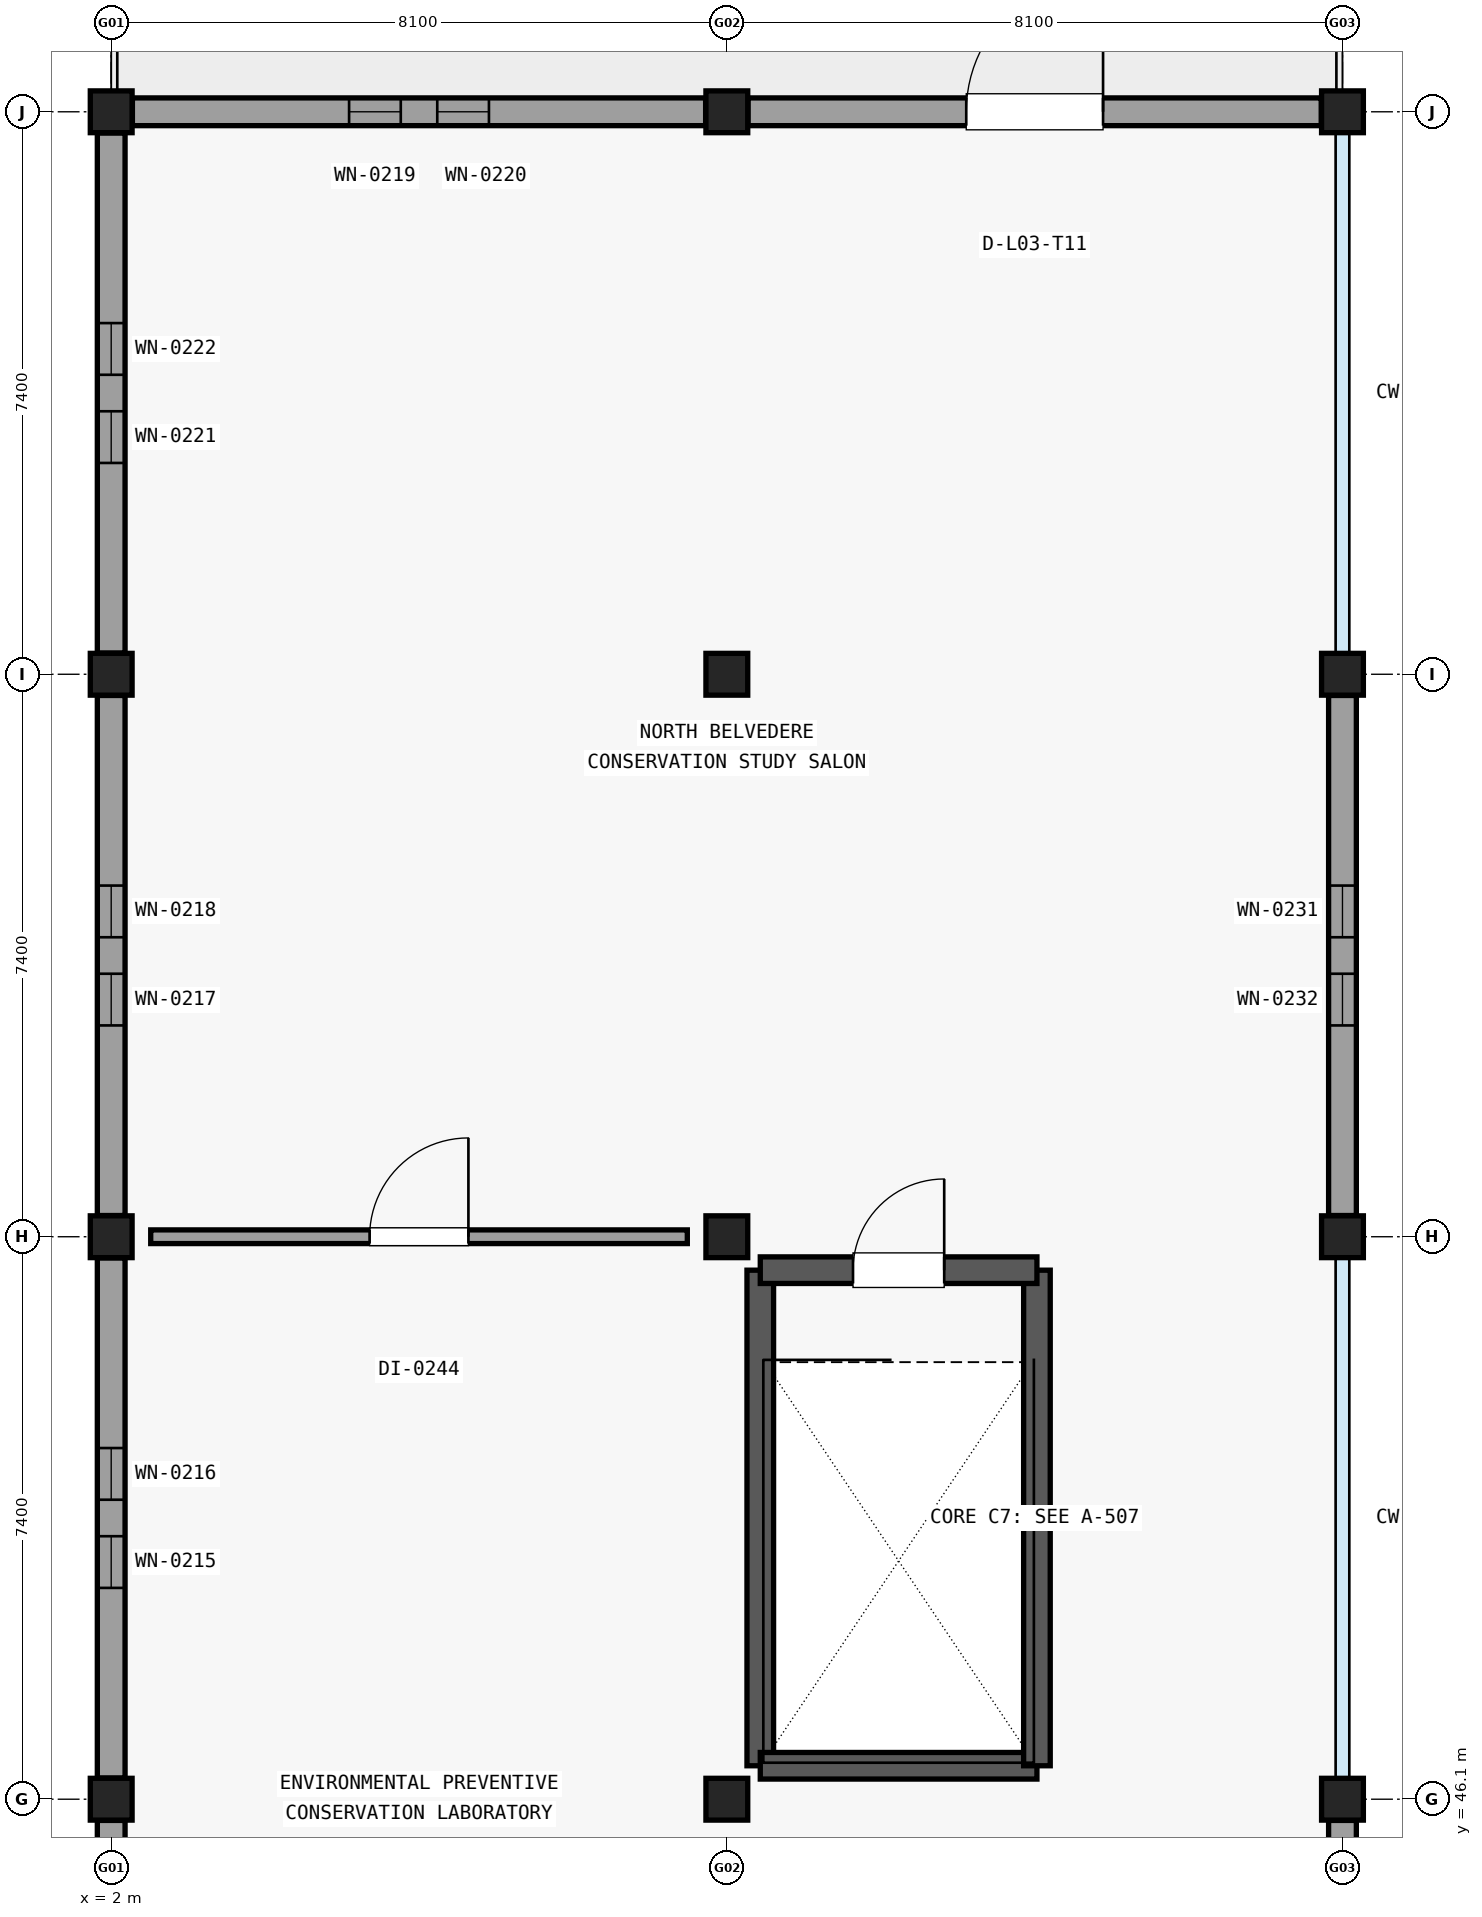
"""IFC4 building model, lengths in metres.
Left out: names, types, materials, properties, quantities, classifications, styles, units other than length and angle.
Written with IfcOpenShell. Run it as: python <this file> out.ifc"""

import sys

from ifc_helpers import new_model, si_unit, direction, frame, frame_2d, origin, origin_2d, place, context, subcontext, project, spatial, rectangle, extrude, element, fill, save


model = new_model("IFC4")
c1 = context("Model", 3, precision=1e-05, world=origin(), true_north=direction((0.0, 1.0)))
c2 = subcontext(c1, "Body", "Model", "MODEL_VIEW")
j1 = project(units=[si_unit("LENGTHUNIT", "METRE"), si_unit("PLANEANGLEUNIT", "RADIAN")], contexts=[c1])
p1 = place(None, origin())
s1 = spatial("IfcSite", under=j1, at=p1, CompositionType="ELEMENT")
p2 = place(p1, origin())
s2 = spatial("IfcBuilding", under=s1, at=p2, CompositionType="ELEMENT")
p3 = place(p2, frame((0.0, 0.0, 13.8)))
s3 = spatial("IfcBuildingStorey", under=s2, at=p3, CompositionType="ELEMENT", Elevation=13.8)
for number, where, z_axis, x_axis in (
    (1, (2.0, 46.1, 0.0), (0.0, 0.0, 1.0), (1.0, 0.0, 0.0)),
    (2, (2.0, 53.5, 0.0), (0.0, 0.0, 1.0), (1.0, 0.0, 0.0)),
    (3, (2.0, 60.9, 0.0), (0.0, 0.0, 1.0), (1.0, 0.0, 0.0)),
    (4, (2.0, 68.3, 0.0), (0.0, 0.0, 1.0), (1.0, 0.0, 0.0)),
    (5, (10.1, 46.1, 0.0), (0.0, 0.0, 1.0), (1.0, 0.0, 0.0)),
    (6, (10.1, 53.5, 0.0), (0.0, 0.0, 1.0), (1.0, 0.0, 0.0)),
    (7, (10.1, 60.9, 0.0), (0.0, 0.0, 1.0), (1.0, 0.0, 0.0)),
    (8, (10.1, 68.3, 0.0), (0.0, 0.0, 1.0), (1.0, 0.0, 0.0)),
    (9, (18.2, 46.1, 0.0), (0.0, 0.0, 1.0), (1.0, 0.0, 0.0)),
    (10, (18.2, 53.5, 0.0), (0.0, 0.0, 1.0), (1.0, 0.0, 0.0)),
    (11, (18.2, 60.9, 0.0), (0.0, 0.0, 1.0), (1.0, 0.0, 0.0)),
    (12, (18.2, 68.3, 0.0), (0.0, 0.0, 1.0), (1.0, 0.0, 0.0)),
):
    element("IfcColumn", number, at=place(p3, frame(where, z_axis=z_axis, x_axis=x_axis)), inside=s3, PredefinedType="COLUMN", context=c2, shape_type="SweptSolid", body=[
        extrude(rectangle(XDim=0.55, YDim=0.55, at=origin_2d()), origin(), (0.0, 0.0, 1.0), 3.38),
    ])
p4 = place(p3, frame((2.0, 38.979, 0.0), z_axis=(0.0, 0.0, 1.0), x_axis=(0.0, 1.0, 0.0)))
e13 = element("IfcWall", 13, at=p4, inside=s3, PredefinedType="SOLIDWALL", context=c2, shape_type="SweptSolid", body=[
    extrude(rectangle(XDim=6.842, YDim=0.365, at=frame_2d((3.421, 0.0))), origin(), (0.0, 0.0, 1.0), 2.908),
])
p5 = place(p4, frame((2.501, 0.0, 0.6)))
e14 = element("IfcOpeningElement", 14, at=p5, cuts=e13, PredefinedType="OPENING", context=c2, shape_type="SweptSolid", body=[
    extrude(rectangle(XDim=0.68, YDim=1.78, at=frame_2d((0.34, 0.89))), frame((0.0, 0.192, 0.0), z_axis=(0.0, -1.0, 0.0), x_axis=(1.0, 0.0, 0.0)), (0.0, 0.0, 1.0), 0.385),
])
p6 = place(p4, frame((3.661, 0.0, 0.6)))
e15 = element("IfcOpeningElement", 15, at=p6, cuts=e13, PredefinedType="OPENING", context=c2, shape_type="SweptSolid", body=[
    extrude(rectangle(XDim=0.68, YDim=1.78, at=frame_2d((0.34, 0.89))), frame((0.0, 0.192, 0.0), z_axis=(0.0, -1.0, 0.0), x_axis=(1.0, 0.0, 0.0)), (0.0, 0.0, 1.0), 0.385),
])
p7 = place(p3, frame((2.0, 46.379, 0.0), z_axis=(0.0, 0.0, 1.0), x_axis=(0.0, 1.0, 0.0)))
e16 = element("IfcWall", 16, at=p7, inside=s3, PredefinedType="SOLIDWALL", context=c2, shape_type="SweptSolid", body=[
    extrude(rectangle(XDim=6.842, YDim=0.365, at=frame_2d((3.421, 0.0))), origin(), (0.0, 0.0, 1.0), 2.908),
])
p8 = place(p7, frame((2.501, 0.0, 0.6)))
e17 = element("IfcOpeningElement", 17, at=p8, cuts=e16, PredefinedType="OPENING", context=c2, shape_type="SweptSolid", body=[
    extrude(rectangle(XDim=0.68, YDim=1.78, at=frame_2d((0.34, 0.89))), frame((0.0, 0.192, 0.0), z_axis=(0.0, -1.0, 0.0), x_axis=(1.0, 0.0, 0.0)), (0.0, 0.0, 1.0), 0.385),
])
p9 = place(p7, frame((3.661, 0.0, 0.6)))
e18 = element("IfcOpeningElement", 18, at=p9, cuts=e16, PredefinedType="OPENING", context=c2, shape_type="SweptSolid", body=[
    extrude(rectangle(XDim=0.68, YDim=1.78, at=frame_2d((0.34, 0.89))), frame((0.0, 0.192, 0.0), z_axis=(0.0, -1.0, 0.0), x_axis=(1.0, 0.0, 0.0)), (0.0, 0.0, 1.0), 0.385),
])
p10 = place(p3, frame((2.0, 53.779, 0.0), z_axis=(0.0, 0.0, 1.0), x_axis=(0.0, 1.0, 0.0)))
e19 = element("IfcWall", 19, at=p10, inside=s3, PredefinedType="SOLIDWALL", context=c2, shape_type="SweptSolid", body=[
    extrude(rectangle(XDim=6.842, YDim=0.365, at=frame_2d((3.421, 0.0))), origin(), (0.0, 0.0, 1.0), 2.908),
])
p11 = place(p10, frame((2.501, 0.0, 0.6)))
e20 = element("IfcOpeningElement", 20, at=p11, cuts=e19, PredefinedType="OPENING", context=c2, shape_type="SweptSolid", body=[
    extrude(rectangle(XDim=0.68, YDim=1.78, at=frame_2d((0.34, 0.89))), frame((0.0, 0.192, 0.0), z_axis=(0.0, -1.0, 0.0), x_axis=(1.0, 0.0, 0.0)), (0.0, 0.0, 1.0), 0.385),
])
p12 = place(p10, frame((3.661, 0.0, 0.6)))
e21 = element("IfcOpeningElement", 21, at=p12, cuts=e19, PredefinedType="OPENING", context=c2, shape_type="SweptSolid", body=[
    extrude(rectangle(XDim=0.68, YDim=1.78, at=frame_2d((0.34, 0.89))), frame((0.0, 0.192, 0.0), z_axis=(0.0, -1.0, 0.0), x_axis=(1.0, 0.0, 0.0)), (0.0, 0.0, 1.0), 0.385),
])
p13 = place(p3, frame((2.279, 68.3, 0.0), z_axis=(0.0, 0.0, 1.0), x_axis=(1.0, 0.0, 0.0)))
e22 = element("IfcWall", 22, at=p13, inside=s3, PredefinedType="SOLIDWALL", context=c2, shape_type="SweptSolid", body=[
    extrude(rectangle(XDim=7.542, YDim=0.365, at=frame_2d((3.771, 0.0))), origin(), (0.0, 0.0, 1.0), 2.908),
])
p14 = place(p13, frame((2.851, 0.0, 0.6)))
e23 = element("IfcOpeningElement", 23, at=p14, cuts=e22, PredefinedType="OPENING", context=c2, shape_type="SweptSolid", body=[
    extrude(rectangle(XDim=0.68, YDim=1.78, at=frame_2d((0.34, 0.89))), frame((0.0, 0.192, 0.0), z_axis=(0.0, -1.0, 0.0), x_axis=(1.0, 0.0, 0.0)), (0.0, 0.0, 1.0), 0.385),
])
p15 = place(p13, frame((4.011, 0.0, 0.6)))
e24 = element("IfcOpeningElement", 24, at=p15, cuts=e22, PredefinedType="OPENING", context=c2, shape_type="SweptSolid", body=[
    extrude(rectangle(XDim=0.68, YDim=1.78, at=frame_2d((0.34, 0.89))), frame((0.0, 0.192, 0.0), z_axis=(0.0, -1.0, 0.0), x_axis=(1.0, 0.0, 0.0)), (0.0, 0.0, 1.0), 0.385),
])
p16 = place(p3, frame((2.0, 61.179, 0.0), z_axis=(0.0, 0.0, 1.0), x_axis=(0.0, 1.0, 0.0)))
e25 = element("IfcWall", 25, at=p16, inside=s3, PredefinedType="SOLIDWALL", context=c2, shape_type="SweptSolid", body=[
    extrude(rectangle(XDim=6.842, YDim=0.365, at=frame_2d((3.421, 0.0))), origin(), (0.0, 0.0, 1.0), 2.908),
])
p17 = place(p16, frame((2.501, 0.0, 0.6)))
e26 = element("IfcOpeningElement", 26, at=p17, cuts=e25, PredefinedType="OPENING", context=c2, shape_type="SweptSolid", body=[
    extrude(rectangle(XDim=0.68, YDim=1.78, at=frame_2d((0.34, 0.89))), frame((0.0, 0.192, 0.0), z_axis=(0.0, -1.0, 0.0), x_axis=(1.0, 0.0, 0.0)), (0.0, 0.0, 1.0), 0.385),
])
p18 = place(p16, frame((3.661, 0.0, 0.6)))
e27 = element("IfcOpeningElement", 27, at=p18, cuts=e25, PredefinedType="OPENING", context=c2, shape_type="SweptSolid", body=[
    extrude(rectangle(XDim=0.68, YDim=1.78, at=frame_2d((0.34, 0.89))), frame((0.0, 0.192, 0.0), z_axis=(0.0, -1.0, 0.0), x_axis=(1.0, 0.0, 0.0)), (0.0, 0.0, 1.0), 0.385),
])
p19 = place(p3, frame((18.2, 45.821, 0.0), z_axis=(0.0, 0.0, 1.0), x_axis=(0.0, -1.0, 0.0)))
e28 = element("IfcWall", 28, at=p19, inside=s3, PredefinedType="SOLIDWALL", context=c2, shape_type="SweptSolid", body=[
    extrude(rectangle(XDim=6.842, YDim=0.365, at=frame_2d((3.421, 0.0))), origin(), (0.0, 0.0, 1.0), 2.908),
])
p20 = place(p19, frame((2.501, 0.0, 0.6)))
e29 = element("IfcOpeningElement", 29, at=p20, cuts=e28, PredefinedType="OPENING", context=c2, shape_type="SweptSolid", body=[
    extrude(rectangle(XDim=0.68, YDim=1.78, at=frame_2d((0.34, 0.89))), frame((0.0, 0.192, 0.0), z_axis=(0.0, -1.0, 0.0), x_axis=(1.0, 0.0, 0.0)), (0.0, 0.0, 1.0), 0.385),
])
p21 = place(p19, frame((3.661, 0.0, 0.6)))
e30 = element("IfcOpeningElement", 30, at=p21, cuts=e28, PredefinedType="OPENING", context=c2, shape_type="SweptSolid", body=[
    extrude(rectangle(XDim=0.68, YDim=1.78, at=frame_2d((0.34, 0.89))), frame((0.0, 0.192, 0.0), z_axis=(0.0, -1.0, 0.0), x_axis=(1.0, 0.0, 0.0)), (0.0, 0.0, 1.0), 0.385),
])
p22 = place(p3, frame((18.2, 60.621, 0.0), z_axis=(0.0, 0.0, 1.0), x_axis=(0.0, -1.0, 0.0)))
e31 = element("IfcWall", 31, at=p22, inside=s3, PredefinedType="SOLIDWALL", context=c2, shape_type="SweptSolid", body=[
    extrude(rectangle(XDim=6.842, YDim=0.365, at=frame_2d((3.421, 0.0))), origin(), (0.0, 0.0, 1.0), 2.908),
])
p23 = place(p22, frame((2.501, 0.0, 0.6)))
e32 = element("IfcOpeningElement", 32, at=p23, cuts=e31, PredefinedType="OPENING", context=c2, shape_type="SweptSolid", body=[
    extrude(rectangle(XDim=0.68, YDim=1.78, at=frame_2d((0.34, 0.89))), frame((0.0, 0.192, 0.0), z_axis=(0.0, -1.0, 0.0), x_axis=(1.0, 0.0, 0.0)), (0.0, 0.0, 1.0), 0.385),
])
p24 = place(p22, frame((3.661, 0.0, 0.6)))
e33 = element("IfcOpeningElement", 33, at=p24, cuts=e31, PredefinedType="OPENING", context=c2, shape_type="SweptSolid", body=[
    extrude(rectangle(XDim=0.68, YDim=1.78, at=frame_2d((0.34, 0.89))), frame((0.0, 0.192, 0.0), z_axis=(0.0, -1.0, 0.0), x_axis=(1.0, 0.0, 0.0)), (0.0, 0.0, 1.0), 0.385),
])
p25 = place(p3, frame((10.379, 68.3, 0.0), z_axis=(0.0, 0.0, 1.0), x_axis=(1.0, 0.0, 0.0)))
e34 = element("IfcWall", 34, at=p25, inside=s3, PredefinedType="SOLIDWALL", context=c2, shape_type="SweptSolid", body=[
    extrude(rectangle(XDim=7.542, YDim=0.365, at=frame_2d((3.771, 0.0))), origin(), (0.0, 0.0, 1.0), 2.908),
])
p26 = place(p25, frame((2.871, 0.0, 0.0)))
e35 = element("IfcOpeningElement", 35, at=p26, cuts=e34, PredefinedType="OPENING", context=c2, shape_type="SweptSolid", body=[
    extrude(rectangle(XDim=1.8, YDim=2.2, at=frame_2d((0.9, 1.1))), frame((0.0, 0.192, 0.0), z_axis=(0.0, -1.0, 0.0), x_axis=(1.0, 0.0, 0.0)), (0.0, 0.0, 1.0), 0.385),
])
p27 = place(p3, frame((10.54, 46.54, 0.0), z_axis=(0.0, 0.0, 1.0), x_axis=(0.0, 1.0, 0.0)))
e36 = element("IfcWall", 36, at=p27, inside=s3, PredefinedType="SHEAR", context=c2, shape_type="SweptSolid", body=[
    extrude(rectangle(XDim=6.52, YDim=0.35, at=frame_2d((3.26, 0.0))), origin(), (0.0, 0.0, 1.0), 3.375),
])
p28 = place(p3, frame((10.54, 46.54, 0.0), z_axis=(0.0, 0.0, 1.0), x_axis=(1.0, 0.0, 0.0)))
e37 = element("IfcWall", 37, at=p28, inside=s3, PredefinedType="SHEAR", context=c2, shape_type="SweptSolid", body=[
    extrude(rectangle(XDim=3.64, YDim=0.35, at=frame_2d((1.82, 0.0))), origin(), (0.0, 0.0, 1.0), 3.375),
])
p29 = place(p3, frame((14.18, 46.54, 0.0), z_axis=(0.0, 0.0, 1.0), x_axis=(0.0, 1.0, 0.0)))
e38 = element("IfcWall", 38, at=p29, inside=s3, PredefinedType="SHEAR", context=c2, shape_type="SweptSolid", body=[
    extrude(rectangle(XDim=6.52, YDim=0.35, at=frame_2d((3.26, 0.0))), origin(), (0.0, 0.0, 1.0), 3.375),
])
p30 = place(p3, frame((10.54, 53.06, 0.0), z_axis=(0.0, 0.0, 1.0), x_axis=(1.0, 0.0, 0.0)))
e39 = element("IfcWall", 39, at=p30, inside=s3, PredefinedType="SHEAR", context=c2, shape_type="SweptSolid", body=[
    extrude(rectangle(XDim=3.64, YDim=0.35, at=frame_2d((1.82, 0.0))), origin(), (0.0, 0.0, 1.0), 3.375),
])
p31 = place(p30, frame((1.22, 0.0, 0.0)))
e40 = element("IfcOpeningElement", 40, at=p31, cuts=e39, PredefinedType="OPENING", context=c2, shape_type="SweptSolid", body=[
    extrude(rectangle(XDim=1.2, YDim=2.15, at=frame_2d((0.6, 1.075))), frame((0.0, 0.185, 0.0), z_axis=(0.0, -1.0, 0.0), x_axis=(1.0, 0.0, 0.0)), (0.0, 0.0, 1.0), 0.37),
])
p32 = place(p3, frame((2.52, 53.5, 0.0), z_axis=(0.0, 0.0, 1.0), x_axis=(1.0, 0.0, 0.0)))
e41 = element("IfcWall", 41, at=p32, inside=s3, PredefinedType="PARTITIONING", context=c2, shape_type="SweptSolid", body=[
    extrude(rectangle(XDim=7.06, YDim=0.18, at=frame_2d((3.53, 0.0))), origin(), (0.0, 0.0, 1.0), 2.913),
])
p33 = place(p32, frame((2.88, 0.0, 0.0)))
e42 = element("IfcOpeningElement", 42, at=p33, cuts=e41, PredefinedType="OPENING", context=c2, shape_type="SweptSolid", body=[
    extrude(rectangle(XDim=1.3, YDim=2.2, at=frame_2d((0.65, 1.1))), frame((0.0, 0.1, 0.0), z_axis=(0.0, -1.0, 0.0), x_axis=(1.0, 0.0, 0.0)), (0.0, 0.0, 1.0), 0.2),
])
p34 = place(p8, origin())
e43 = element("IfcWindow", 43, at=p34, inside=s3, PartitioningType="SINGLE_PANEL", PredefinedType="WINDOW", context=c2, shape_type="SweptSolid", body=[
    extrude(rectangle(XDim=0.68, YDim=1.78, at=frame_2d((0.34, 0.89))), frame((0.0, 0.03, 0.0), z_axis=(0.0, -1.0, 0.0), x_axis=(1.0, 0.0, 0.0)), (0.0, 0.0, 1.0), 0.06),
])
fill(e17, e43)
p35 = place(p9, origin())
e44 = element("IfcWindow", 44, at=p35, inside=s3, PartitioningType="SINGLE_PANEL", PredefinedType="WINDOW", context=c2, shape_type="SweptSolid", body=[
    extrude(rectangle(XDim=0.68, YDim=1.78, at=frame_2d((0.34, 0.89))), frame((0.0, 0.03, 0.0), z_axis=(0.0, -1.0, 0.0), x_axis=(1.0, 0.0, 0.0)), (0.0, 0.0, 1.0), 0.06),
])
fill(e18, e44)
p36 = place(p11, origin())
e45 = element("IfcWindow", 45, at=p36, inside=s3, PartitioningType="SINGLE_PANEL", PredefinedType="WINDOW", context=c2, shape_type="SweptSolid", body=[
    extrude(rectangle(XDim=0.68, YDim=1.78, at=frame_2d((0.34, 0.89))), frame((0.0, 0.03, 0.0), z_axis=(0.0, -1.0, 0.0), x_axis=(1.0, 0.0, 0.0)), (0.0, 0.0, 1.0), 0.06),
])
fill(e20, e45)
p37 = place(p12, origin())
e46 = element("IfcWindow", 46, at=p37, inside=s3, PartitioningType="SINGLE_PANEL", PredefinedType="WINDOW", context=c2, shape_type="SweptSolid", body=[
    extrude(rectangle(XDim=0.68, YDim=1.78, at=frame_2d((0.34, 0.89))), frame((0.0, 0.03, 0.0), z_axis=(0.0, -1.0, 0.0), x_axis=(1.0, 0.0, 0.0)), (0.0, 0.0, 1.0), 0.06),
])
fill(e21, e46)
p38 = place(p14, origin())
e47 = element("IfcWindow", 47, at=p38, inside=s3, PartitioningType="SINGLE_PANEL", PredefinedType="WINDOW", context=c2, shape_type="SweptSolid", body=[
    extrude(rectangle(XDim=0.68, YDim=1.78, at=frame_2d((0.34, 0.89))), frame((0.0, 0.03, 0.0), z_axis=(0.0, -1.0, 0.0), x_axis=(1.0, 0.0, 0.0)), (0.0, 0.0, 1.0), 0.06),
])
fill(e23, e47)
p39 = place(p15, origin())
e48 = element("IfcWindow", 48, at=p39, inside=s3, PartitioningType="SINGLE_PANEL", PredefinedType="WINDOW", context=c2, shape_type="SweptSolid", body=[
    extrude(rectangle(XDim=0.68, YDim=1.78, at=frame_2d((0.34, 0.89))), frame((0.0, 0.03, 0.0), z_axis=(0.0, -1.0, 0.0), x_axis=(1.0, 0.0, 0.0)), (0.0, 0.0, 1.0), 0.06),
])
fill(e24, e48)
p40 = place(p17, origin())
e49 = element("IfcWindow", 49, at=p40, inside=s3, PartitioningType="SINGLE_PANEL", PredefinedType="WINDOW", context=c2, shape_type="SweptSolid", body=[
    extrude(rectangle(XDim=0.68, YDim=1.78, at=frame_2d((0.34, 0.89))), frame((0.0, 0.03, 0.0), z_axis=(0.0, -1.0, 0.0), x_axis=(1.0, 0.0, 0.0)), (0.0, 0.0, 1.0), 0.06),
])
fill(e26, e49)
p41 = place(p18, origin())
e50 = element("IfcWindow", 50, at=p41, inside=s3, PartitioningType="SINGLE_PANEL", PredefinedType="WINDOW", context=c2, shape_type="SweptSolid", body=[
    extrude(rectangle(XDim=0.68, YDim=1.78, at=frame_2d((0.34, 0.89))), frame((0.0, 0.03, 0.0), z_axis=(0.0, -1.0, 0.0), x_axis=(1.0, 0.0, 0.0)), (0.0, 0.0, 1.0), 0.06),
])
fill(e27, e50)
p42 = place(p23, origin())
e51 = element("IfcWindow", 51, at=p42, inside=s3, PartitioningType="SINGLE_PANEL", PredefinedType="WINDOW", context=c2, shape_type="SweptSolid", body=[
    extrude(rectangle(XDim=0.68, YDim=1.78, at=frame_2d((0.34, 0.89))), frame((0.0, 0.03, 0.0), z_axis=(0.0, -1.0, 0.0), x_axis=(1.0, 0.0, 0.0)), (0.0, 0.0, 1.0), 0.06),
])
fill(e32, e51)
p43 = place(p24, origin())
e52 = element("IfcWindow", 52, at=p43, inside=s3, PartitioningType="SINGLE_PANEL", PredefinedType="WINDOW", context=c2, shape_type="SweptSolid", body=[
    extrude(rectangle(XDim=0.68, YDim=1.78, at=frame_2d((0.34, 0.89))), frame((0.0, 0.03, 0.0), z_axis=(0.0, -1.0, 0.0), x_axis=(1.0, 0.0, 0.0)), (0.0, 0.0, 1.0), 0.06),
])
fill(e33, e52)
p44 = place(p26, origin())
e53 = element("IfcDoor", 53, at=p44, inside=s3, OperationType="SINGLE_SWING_RIGHT", PredefinedType="DOOR", context=c2, shape_type="SweptSolid", body=[
    extrude(rectangle(XDim=1.8, YDim=2.2, at=frame_2d((0.9, 1.1))), frame((0.0, 0.025, 0.0), z_axis=(0.0, -1.0, 0.0), x_axis=(1.0, 0.0, 0.0)), (0.0, 0.0, 1.0), 0.05),
])
fill(e35, e53)
p45 = place(p31, origin())
e54 = element("IfcDoor", 54, at=p45, inside=s3, OperationType="SINGLE_SWING_RIGHT", PredefinedType="DOOR", context=c2, shape_type="SweptSolid", body=[
    extrude(rectangle(XDim=1.2, YDim=2.15, at=frame_2d((0.6, 1.075))), frame((0.0, 0.025, 0.0), z_axis=(0.0, -1.0, 0.0), x_axis=(1.0, 0.0, 0.0)), (0.0, 0.0, 1.0), 0.05),
])
fill(e40, e54)
p46 = place(p33, origin())
e55 = element("IfcDoor", 55, at=p46, inside=s3, OperationType="SINGLE_SWING_RIGHT", PredefinedType="DOOR", context=c2, shape_type="SweptSolid", body=[
    extrude(rectangle(XDim=1.3, YDim=2.2, at=frame_2d((0.65, 1.1))), frame((0.0, 0.025, 0.0), z_axis=(0.0, -1.0, 0.0), x_axis=(1.0, 0.0, 0.0)), (0.0, 0.0, 1.0), 0.05),
])
fill(e42, e55)
save(model, sys.argv[1])
